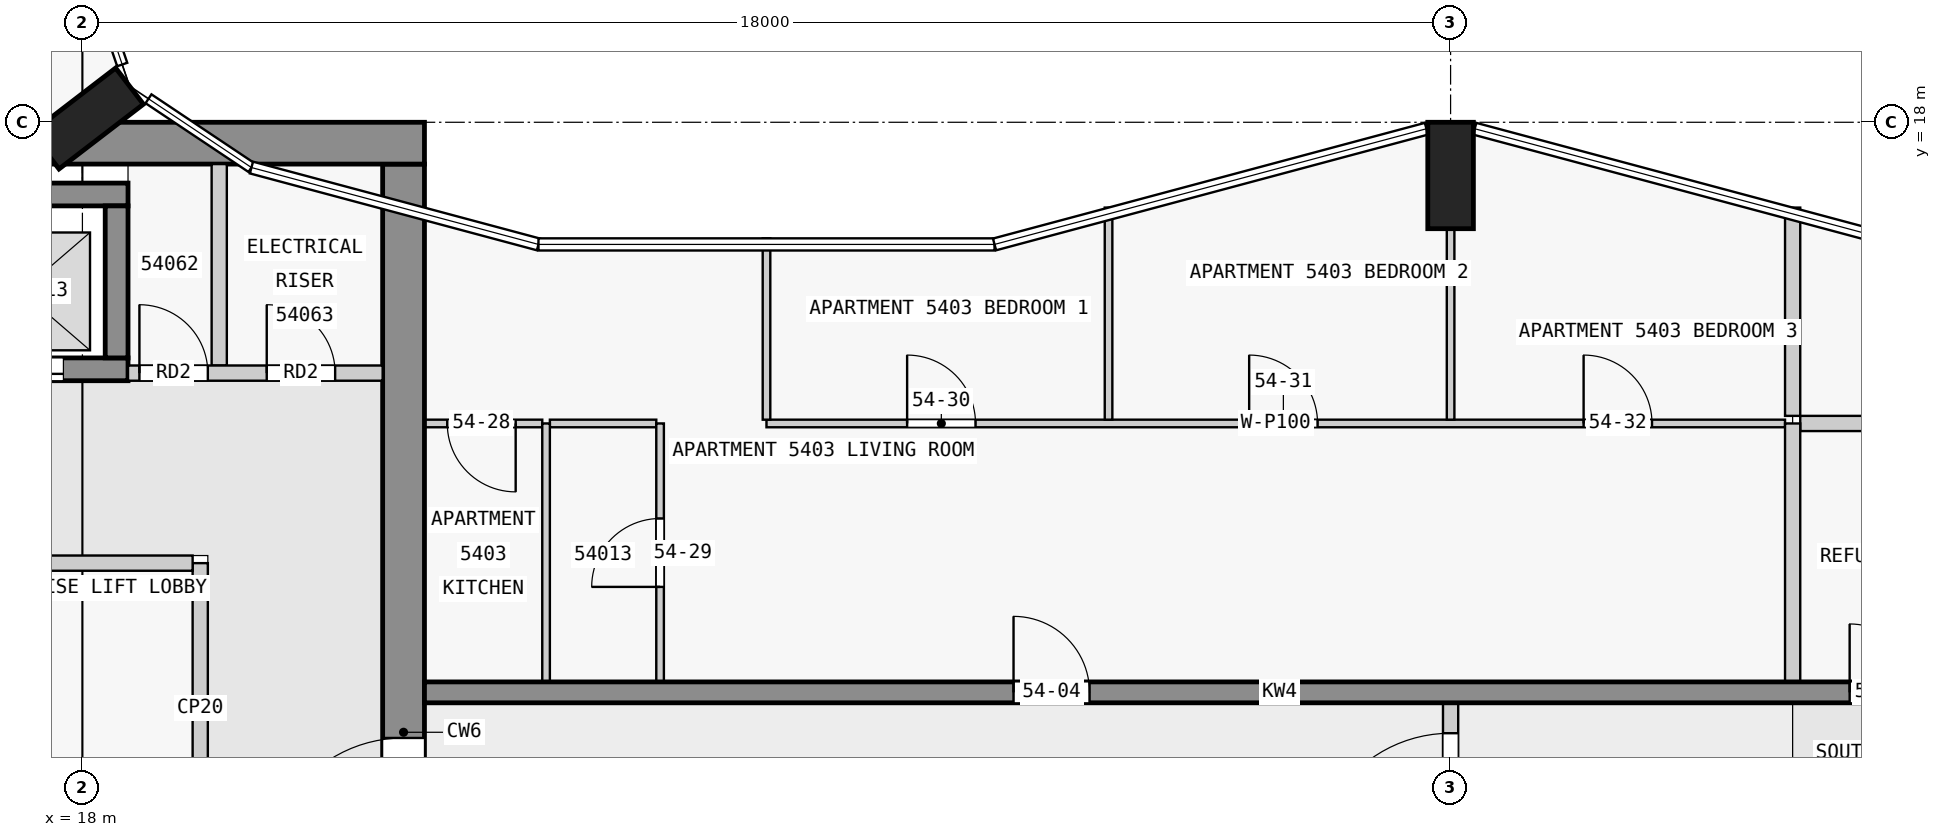
"""IFC4 building model, lengths in metres.
Left out: names, types, materials, properties, quantities, classifications, styles, units other than length and angle.
Written with IfcOpenShell. Run it as: python <this file> out.ifc"""

import sys

from ifc_helpers import new_model, si_unit, direction, frame, frame_2d, origin, origin_2d, place, context, subcontext, project, spatial, rectangle, extrude, element, fill, save


model = new_model("IFC4")
c1 = context("Model", 3, precision=1e-05, world=origin(), true_north=direction((0.0, 1.0)))
c2 = subcontext(c1, "Body", "Model", "MODEL_VIEW")
j1 = project(units=[si_unit("LENGTHUNIT", "METRE"), si_unit("PLANEANGLEUNIT", "RADIAN")], contexts=[c1])
p1 = place(None, origin())
s1 = spatial("IfcSite", under=j1, at=p1, CompositionType="ELEMENT")
p2 = place(p1, origin())
s2 = spatial("IfcBuilding", under=s1, at=p2, CompositionType="ELEMENT")
p3 = place(p2, frame((0.0, 0.0, 208.4)))
s3 = spatial("IfcBuildingStorey", under=s2, at=p3, CompositionType="ELEMENT", Elevation=208.4)
for number, where, z_axis, x_axis in (
    (1, (36.0, 17.3, 0.0), (0.0, 0.0, 1.0), (1.0, 0.0, 0.0)),
    (2, (18.065, 18.05, 0.0), (0.0, 0.0, 1.0), (-0.609, 0.793, 0.0)),
):
    element("IfcColumn", number, at=place(p3, frame(where, z_axis=z_axis, x_axis=x_axis)), inside=s3, PredefinedType="COLUMN", context=c2, shape_type="SweptSolid", body=[
        extrude(rectangle(XDim=0.6, YDim=1.4, at=origin_2d()), origin(), (0.0, 0.0, 1.0), 3.5),
    ])
p4 = place(p3, frame((1.38, 17.725, 0.0), z_axis=(0.0, 0.0, 1.0), x_axis=(1.0, 0.0, 0.0)))
e3 = element("IfcWall", 3, at=p4, inside=s3, PredefinedType="SHEAR", context=c2, shape_type="SweptSolid", body=[
    extrude(rectangle(XDim=21.12, YDim=0.55, at=frame_2d((10.56, 0.0))), origin(), (0.0, 0.0, 1.0), 3.25),
])
p5 = place(p4, frame((6.35, 0.0, 0.0)))
e4 = element("IfcOpeningElement", 4, at=p5, cuts=e3, PredefinedType="OPENING", context=c2, shape_type="SweptSolid", body=[
    extrude(rectangle(XDim=1.8, YDim=2.1, at=frame_2d((0.9, 1.05))), frame((0.0, 0.285, 0.0), z_axis=(0.0, -1.0, 0.0), x_axis=(1.0, 0.0, 0.0)), (0.0, 0.0, 1.0), 0.57),
])
p6 = place(p3, frame((22.225, 2.5, 0.0), z_axis=(0.0, 0.0, 1.0), x_axis=(0.0, 1.0, 0.0)))
e5 = element("IfcWall", 5, at=p6, inside=s3, PredefinedType="SHEAR", context=c2, shape_type="SweptSolid", body=[
    extrude(rectangle(XDim=14.95, YDim=0.55, at=frame_2d((7.475, 0.0))), origin(), (0.0, 0.0, 1.0), 3.25),
])
p7 = place(p6, frame((5.6, 0.0, 0.0)))
e6 = element("IfcOpeningElement", 6, at=p7, cuts=e5, PredefinedType="OPENING", context=c2, shape_type="SweptSolid", body=[
    extrude(rectangle(XDim=1.8, YDim=2.1, at=frame_2d((0.9, 1.05))), frame((0.0, 0.285, 0.0), z_axis=(0.0, -1.0, 0.0), x_axis=(1.0, 0.0, 0.0)), (0.0, 0.0, 1.0), 0.57),
])
p8 = place(p3, frame((10.8, 17.05, 0.0), z_axis=(0.0, 0.0, 1.0), x_axis=(1.0, 0.0, 0.0)))
e7 = element("IfcWall", 7, at=p8, inside=s3, PredefinedType="SHEAR", context=c2, shape_type="SweptSolid", body=[
    extrude(rectangle(XDim=7.8, YDim=0.3, at=frame_2d((3.9, 0.0))), origin(), (0.0, 0.0, 1.0), 3.25),
])
p9 = place(p3, frame((10.8, 14.75, 0.0), z_axis=(0.0, 0.0, 1.0), x_axis=(1.0, 0.0, 0.0)))
e8 = element("IfcWall", 8, at=p9, inside=s3, PredefinedType="SHEAR", context=c2, shape_type="SweptSolid", body=[
    extrude(rectangle(XDim=7.8, YDim=0.3, at=frame_2d((3.9, 0.0))), origin(), (0.0, 0.0, 1.0), 3.25),
])
p10 = place(p9, frame((0.85, 0.0, 0.0)))
e9 = element("IfcOpeningElement", 9, at=p10, cuts=e8, PredefinedType="OPENING", context=c2, shape_type="SweptSolid", body=[
    extrude(rectangle(XDim=1.1, YDim=2.1, at=frame_2d((0.55, 1.05))), frame((0.0, 0.16, 0.0), z_axis=(0.0, -1.0, 0.0), x_axis=(1.0, 0.0, 0.0)), (0.0, 0.0, 1.0), 0.32),
])
p11 = place(p9, frame((3.35, 0.0, 0.0)))
e10 = element("IfcOpeningElement", 10, at=p11, cuts=e8, PredefinedType="OPENING", context=c2, shape_type="SweptSolid", body=[
    extrude(rectangle(XDim=1.1, YDim=2.1, at=frame_2d((0.55, 1.05))), frame((0.0, 0.16, 0.0), z_axis=(0.0, -1.0, 0.0), x_axis=(1.0, 0.0, 0.0)), (0.0, 0.0, 1.0), 0.32),
])
p12 = place(p9, frame((5.85, 0.0, 0.0)))
e11 = element("IfcOpeningElement", 11, at=p12, cuts=e8, PredefinedType="OPENING", context=c2, shape_type="SweptSolid", body=[
    extrude(rectangle(XDim=1.1, YDim=2.1, at=frame_2d((0.55, 1.05))), frame((0.0, 0.16, 0.0), z_axis=(0.0, -1.0, 0.0), x_axis=(1.0, 0.0, 0.0)), (0.0, 0.0, 1.0), 0.32),
])
p13 = place(p3, frame((18.45, 14.9, 0.0), z_axis=(0.0, 0.0, 1.0), x_axis=(0.0, 1.0, 0.0)))
e12 = element("IfcWall", 12, at=p13, inside=s3, PredefinedType="SHEAR", context=c2, shape_type="SweptSolid", body=[
    extrude(rectangle(XDim=2.0, YDim=0.3, at=frame_2d((1.0, 0.0))), origin(), (0.0, 0.0, 1.0), 3.25),
])
p14 = place(p3, frame((22.5, 10.5, 0.0), z_axis=(0.0, 0.0, 1.0), x_axis=(1.0, 0.0, 0.0)))
e13 = element("IfcWall", 13, at=p14, inside=s3, PredefinedType="SHEAR", context=c2, shape_type="SweptSolid", body=[
    extrude(rectangle(XDim=22.5, YDim=0.275, at=frame_2d((11.25, 0.0))), origin(), (0.0, 0.0, 1.0), 3.25),
])
p15 = place(p14, frame((7.75, 0.0, 0.0)))
e14 = element("IfcOpeningElement", 14, at=p15, cuts=e13, PredefinedType="OPENING", context=c2, shape_type="SweptSolid", body=[
    extrude(rectangle(XDim=1.0, YDim=2.1, at=frame_2d((0.5, 1.05))), frame((0.0, 0.147, 0.0), z_axis=(0.0, -1.0, 0.0), x_axis=(1.0, 0.0, 0.0)), (0.0, 0.0, 1.0), 0.295),
])
p16 = place(p14, frame((18.75, 0.0, 0.0)))
e15 = element("IfcOpeningElement", 15, at=p16, cuts=e13, PredefinedType="OPENING", context=c2, shape_type="SweptSolid", body=[
    extrude(rectangle(XDim=0.9, YDim=2.1, at=frame_2d((0.45, 1.05))), frame((0.0, 0.147, 0.0), z_axis=(0.0, -1.0, 0.0), x_axis=(1.0, 0.0, 0.0)), (0.0, 0.0, 1.0), 0.295),
])
p17 = place(p14, frame((20.95, 0.0, 0.0)))
e16 = element("IfcOpeningElement", 16, at=p17, cuts=e13, PredefinedType="OPENING", context=c2, shape_type="SweptSolid", body=[
    extrude(rectangle(XDim=1.0, YDim=2.1, at=frame_2d((0.5, 1.05))), frame((0.0, 0.147, 0.0), z_axis=(0.0, -1.0, 0.0), x_axis=(1.0, 0.0, 0.0)), (0.0, 0.0, 1.0), 0.295),
])
p18 = place(p3, frame((19.55, 8.4, 0.0), z_axis=(0.0, 0.0, 1.0), x_axis=(0.0, 1.0, 0.0)))
e17 = element("IfcWall", 17, at=p18, inside=s3, PredefinedType="PARTITIONING", context=c2, shape_type="SweptSolid", body=[
    extrude(rectangle(XDim=3.8, YDim=0.2, at=frame_2d((1.9, 0.0))), origin(), (0.0, 0.0, 1.0), 3.25),
])
p19 = place(p3, frame((10.9, 12.2, 0.0), z_axis=(0.0, 0.0, 1.0), x_axis=(1.0, 0.0, 0.0)))
e18 = element("IfcWall", 18, at=p19, inside=s3, PredefinedType="PARTITIONING", context=c2, shape_type="SweptSolid", body=[
    extrude(rectangle(XDim=8.55, YDim=0.2, at=frame_2d((4.275, 0.0))), origin(), (0.0, 0.0, 1.0), 3.25),
])
p20 = place(p19, frame((3.825, 0.0, 0.0)))
e19 = element("IfcOpeningElement", 19, at=p20, cuts=e18, PredefinedType="OPENING", context=c2, shape_type="SweptSolid", body=[
    extrude(rectangle(XDim=0.9, YDim=2.1, at=frame_2d((0.45, 1.05))), frame((0.0, 0.11, 0.0), z_axis=(0.0, -1.0, 0.0), x_axis=(1.0, 0.0, 0.0)), (0.0, 0.0, 1.0), 0.22),
])
p21 = place(p3, frame((18.6, 14.7, 0.0), z_axis=(0.0, 0.0, 1.0), x_axis=(1.0, 0.0, 0.0)))
e20 = element("IfcWall", 20, at=p21, inside=s3, PredefinedType="PARTITIONING", context=c2, shape_type="SweptSolid", body=[
    extrude(rectangle(XDim=3.35, YDim=0.2, at=frame_2d((1.675, 0.0))), origin(), (0.0, 0.0, 1.0), 3.25),
])
p22 = place(p21, frame((0.15, 0.0, 0.0)))
e21 = element("IfcOpeningElement", 21, at=p22, cuts=e20, PredefinedType="OPENING", context=c2, shape_type="SweptSolid", body=[
    extrude(rectangle(XDim=0.9, YDim=2.1, at=frame_2d((0.45, 1.05))), frame((0.0, 0.11, 0.0), z_axis=(0.0, -1.0, 0.0), x_axis=(1.0, 0.0, 0.0)), (0.0, 0.0, 1.0), 0.22),
])
p23 = place(p21, frame((1.825, 0.0, 0.0)))
e22 = element("IfcOpeningElement", 22, at=p23, cuts=e20, PredefinedType="OPENING", context=c2, shape_type="SweptSolid", body=[
    extrude(rectangle(XDim=0.9, YDim=2.1, at=frame_2d((0.45, 1.05))), frame((0.0, 0.11, 0.0), z_axis=(0.0, -1.0, 0.0), x_axis=(1.0, 0.0, 0.0)), (0.0, 0.0, 1.0), 0.22),
])
p24 = place(p3, frame((19.8, 14.8, 0.0), z_axis=(0.0, 0.0, 1.0), x_axis=(0.0, 1.0, 0.0)))
e23 = element("IfcWall", 23, at=p24, inside=s3, PredefinedType="PARTITIONING", context=c2, shape_type="SweptSolid", body=[
    extrude(rectangle(XDim=2.65, YDim=0.2, at=frame_2d((1.325, 0.0))), origin(), (0.0, 0.0, 1.0), 3.25),
])
p25 = place(p3, frame((24.05, 14.038, 0.0), z_axis=(0.0, 0.0, 1.0), x_axis=(-1.0, 0.0, 0.0)))
e24 = element("IfcWall", 24, at=p25, inside=s3, PredefinedType="PARTITIONING", context=c2, shape_type="SweptSolid", body=[
    extrude(rectangle(XDim=1.55, YDim=0.1, at=frame_2d((0.775, 0.0))), origin(), (0.0, 0.0, 1.0), 3.25),
])
p26 = place(p25, frame((0.35, 0.0, 0.0)))
e25 = element("IfcOpeningElement", 25, at=p26, cuts=e24, PredefinedType="OPENING", context=c2, shape_type="SweptSolid", body=[
    extrude(rectangle(XDim=0.9, YDim=2.1, at=frame_2d((0.45, 1.05))), frame((0.0, 0.06, 0.0), z_axis=(0.0, -1.0, 0.0), x_axis=(1.0, 0.0, 0.0)), (0.0, 0.0, 1.0), 0.12),
])
p27 = place(p3, frame((25.55, 14.038, 0.0), z_axis=(0.0, 0.0, 1.0), x_axis=(-1.0, 0.0, 0.0)))
e26 = element("IfcWall", 26, at=p27, inside=s3, PredefinedType="PARTITIONING", context=c2, shape_type="SweptSolid", body=[
    extrude(rectangle(XDim=1.4, YDim=0.1, at=frame_2d((0.7, 0.0))), origin(), (0.0, 0.0, 1.0), 3.25),
])
p28 = place(p3, frame((27.0, 14.038, 0.0), z_axis=(0.0, 0.0, 1.0), x_axis=(1.0, 0.0, 0.0)))
e27 = element("IfcWall", 27, at=p28, inside=s3, PredefinedType="PARTITIONING", context=c2, shape_type="SweptSolid", body=[
    extrude(rectangle(XDim=13.4, YDim=0.1, at=frame_2d((6.7, 0.0))), origin(), (0.0, 0.0, 1.0), 3.25),
])
p29 = place(p28, frame((1.85, 0.0, 0.0)))
e28 = element("IfcOpeningElement", 28, at=p29, cuts=e27, PredefinedType="OPENING", context=c2, shape_type="SweptSolid", body=[
    extrude(rectangle(XDim=0.9, YDim=2.1, at=frame_2d((0.45, 1.05))), frame((0.0, 0.06, 0.0), z_axis=(0.0, -1.0, 0.0), x_axis=(1.0, 0.0, 0.0)), (0.0, 0.0, 1.0), 0.12),
])
p30 = place(p28, frame((6.35, 0.0, 0.0)))
e29 = element("IfcOpeningElement", 29, at=p30, cuts=e27, PredefinedType="OPENING", context=c2, shape_type="SweptSolid", body=[
    extrude(rectangle(XDim=0.9, YDim=2.1, at=frame_2d((0.45, 1.05))), frame((0.0, 0.06, 0.0), z_axis=(0.0, -1.0, 0.0), x_axis=(1.0, 0.0, 0.0)), (0.0, 0.0, 1.0), 0.12),
])
p31 = place(p28, frame((10.75, 0.0, 0.0)))
e30 = element("IfcOpeningElement", 30, at=p31, cuts=e27, PredefinedType="OPENING", context=c2, shape_type="SweptSolid", body=[
    extrude(rectangle(XDim=0.9, YDim=2.1, at=frame_2d((0.45, 1.05))), frame((0.0, 0.06, 0.0), z_axis=(0.0, -1.0, 0.0), x_axis=(1.0, 0.0, 0.0)), (0.0, 0.0, 1.0), 0.12),
])
p32 = place(p3, frame((42.8, 14.038, 0.0), z_axis=(0.0, 0.0, 1.0), x_axis=(-1.0, 0.0, 0.0)))
e31 = element("IfcWall", 31, at=p32, inside=s3, PredefinedType="PARTITIONING", context=c2, shape_type="SweptSolid", body=[
    extrude(rectangle(XDim=2.2, YDim=0.2, at=frame_2d((1.1, 0.0))), origin(), (0.0, 0.0, 1.0), 3.25),
])
p33 = place(p3, frame((24.1, 10.637, 0.0), z_axis=(0.0, 0.0, 1.0), x_axis=(0.0, 1.0, 0.0)))
e32 = element("IfcWall", 32, at=p33, inside=s3, PredefinedType="PARTITIONING", context=c2, shape_type="SweptSolid", body=[
    extrude(rectangle(XDim=3.4, YDim=0.1, at=frame_2d((1.7, 0.0))), origin(), (0.0, 0.0, 1.0), 3.25),
])
p34 = place(p3, frame((25.6, 10.637, 0.0), z_axis=(0.0, 0.0, 1.0), x_axis=(0.0, 1.0, 0.0)))
e33 = element("IfcWall", 33, at=p34, inside=s3, PredefinedType="PARTITIONING", context=c2, shape_type="SweptSolid", body=[
    extrude(rectangle(XDim=3.4, YDim=0.1, at=frame_2d((1.7, 0.0))), origin(), (0.0, 0.0, 1.0), 3.25),
])
p35 = place(p34, frame((1.25, 0.0, 0.0)))
e34 = element("IfcOpeningElement", 34, at=p35, cuts=e33, PredefinedType="OPENING", context=c2, shape_type="SweptSolid", body=[
    extrude(rectangle(XDim=0.9, YDim=2.1, at=frame_2d((0.45, 1.05))), frame((0.0, 0.06, 0.0), z_axis=(0.0, -1.0, 0.0), x_axis=(1.0, 0.0, 0.0)), (0.0, 0.0, 1.0), 0.12),
])
p36 = place(p3, frame((27.0, 16.473, 0.0), z_axis=(0.0, 0.0, 1.0), x_axis=(0.0, -1.0, 0.0)))
e35 = element("IfcWall", 35, at=p36, inside=s3, PredefinedType="PARTITIONING", context=c2, shape_type="SweptSolid", body=[
    extrude(rectangle(XDim=2.386, YDim=0.1, at=frame_2d((1.193, 0.0))), origin(), (0.0, 0.0, 1.0), 3.25),
])
p37 = place(p3, frame((31.5, 14.087, 0.0), z_axis=(0.0, 0.0, 1.0), x_axis=(0.0, 1.0, 0.0)))
e36 = element("IfcWall", 36, at=p37, inside=s3, PredefinedType="PARTITIONING", context=c2, shape_type="SweptSolid", body=[
    extrude(rectangle(XDim=2.79, YDim=0.1, at=frame_2d((1.395, 0.0))), origin(), (0.0, 0.0, 1.0), 3.25),
])
p38 = place(p3, frame((36.0, 14.087, 0.0), z_axis=(0.0, 0.0, 1.0), x_axis=(0.0, 1.0, 0.0)))
e37 = element("IfcWall", 37, at=p38, inside=s3, PredefinedType="PARTITIONING", context=c2, shape_type="SweptSolid", body=[
    extrude(rectangle(XDim=2.513, YDim=0.1, at=frame_2d((1.256, 0.0))), origin(), (0.0, 0.0, 1.0), 3.25),
])
p39 = place(p3, frame((40.5, 14.038, 0.0), z_axis=(0.0, 0.0, 1.0), x_axis=(0.0, -1.0, 0.0)))
e38 = element("IfcWall", 38, at=p39, inside=s3, PredefinedType="PARTITIONING", context=c2, shape_type="SweptSolid", body=[
    extrude(rectangle(XDim=3.4, YDim=0.2, at=frame_2d((1.7, 0.0))), origin(), (0.0, 0.0, 1.0), 3.25),
])
p40 = place(p3, frame((40.5, 14.137, 0.0), z_axis=(0.0, 0.0, 1.0), x_axis=(0.0, 1.0, 0.0)))
e39 = element("IfcWall", 39, at=p40, inside=s3, PredefinedType="PARTITIONING", context=c2, shape_type="SweptSolid", body=[
    extrude(rectangle(XDim=2.74, YDim=0.2, at=frame_2d((1.37, 0.0))), origin(), (0.0, 0.0, 1.0), 3.25),
])
p41 = place(p3, frame((36.0, 7.462, 0.0), z_axis=(0.0, 0.0, 1.0), x_axis=(0.0, 1.0, 0.0)))
e40 = element("IfcWall", 40, at=p41, inside=s3, PredefinedType="PARTITIONING", context=c2, shape_type="SweptSolid", body=[
    extrude(rectangle(XDim=3.175, YDim=0.2, at=frame_2d((1.587, 0.0))), origin(), (0.0, 0.0, 1.0), 3.25),
])
p42 = place(p41, frame((0.7, 0.0, 0.0)))
e41 = element("IfcOpeningElement", 41, at=p42, cuts=e40, PredefinedType="OPENING", context=c2, shape_type="SweptSolid", body=[
    extrude(rectangle(XDim=1.8, YDim=2.1, at=frame_2d((0.9, 1.05))), frame((0.0, 0.11, 0.0), z_axis=(0.0, -1.0, 0.0), x_axis=(1.0, 0.0, 0.0)), (0.0, 0.0, 1.0), 0.22),
])
p43 = place(p12, origin())
e42 = element("IfcDoor", 42, at=p43, inside=s3, OperationType="DOUBLE_DOOR_SLIDING", PredefinedType="DOOR", context=c2, shape_type="SweptSolid", body=[
    extrude(rectangle(XDim=1.1, YDim=2.1, at=frame_2d((0.55, 1.05))), frame((0.0, 0.025, 0.0), z_axis=(0.0, -1.0, 0.0), x_axis=(1.0, 0.0, 0.0)), (0.0, 0.0, 1.0), 0.05),
])
fill(e11, e42)
p44 = place(p7, origin())
e43 = element("IfcDoor", 43, at=p44, inside=s3, OperationType="DOUBLE_DOOR_SINGLE_SWING", PredefinedType="DOOR", context=c2, shape_type="SweptSolid", body=[
    extrude(rectangle(XDim=1.8, YDim=2.1, at=frame_2d((0.9, 1.05))), frame((0.0, 0.025, 0.0), z_axis=(0.0, -1.0, 0.0), x_axis=(1.0, 0.0, 0.0)), (0.0, 0.0, 1.0), 0.05),
])
fill(e6, e43)
p45 = place(p22, origin())
e44 = element("IfcDoor", 44, at=p45, inside=s3, OperationType="SINGLE_SWING_LEFT", PredefinedType="DOOR", context=c2, shape_type="SweptSolid", body=[
    extrude(rectangle(XDim=0.9, YDim=2.1, at=frame_2d((0.45, 1.05))), frame((0.0, 0.025, 0.0), z_axis=(0.0, -1.0, 0.0), x_axis=(1.0, 0.0, 0.0)), (0.0, 0.0, 1.0), 0.05),
])
fill(e21, e44)
p46 = place(p23, origin())
e45 = element("IfcDoor", 45, at=p46, inside=s3, OperationType="SINGLE_SWING_LEFT", PredefinedType="DOOR", context=c2, shape_type="SweptSolid", body=[
    extrude(rectangle(XDim=0.9, YDim=2.1, at=frame_2d((0.45, 1.05))), frame((0.0, 0.025, 0.0), z_axis=(0.0, -1.0, 0.0), x_axis=(1.0, 0.0, 0.0)), (0.0, 0.0, 1.0), 0.05),
])
fill(e22, e45)
p47 = place(p15, origin())
e46 = element("IfcDoor", 46, at=p47, inside=s3, OperationType="SINGLE_SWING_LEFT", PredefinedType="DOOR", context=c2, shape_type="SweptSolid", body=[
    extrude(rectangle(XDim=1.0, YDim=2.1, at=frame_2d((0.5, 1.05))), frame((0.0, 0.025, 0.0), z_axis=(0.0, -1.0, 0.0), x_axis=(1.0, 0.0, 0.0)), (0.0, 0.0, 1.0), 0.05),
])
fill(e14, e46)
p48 = place(p16, origin())
e47 = element("IfcDoor", 47, at=p48, inside=s3, OperationType="SINGLE_SWING_RIGHT", PredefinedType="DOOR", context=c2, shape_type="SweptSolid", body=[
    extrude(rectangle(XDim=0.9, YDim=2.1, at=frame_2d((0.45, 1.05))), frame((0.0, 0.025, 0.0), z_axis=(0.0, -1.0, 0.0), x_axis=(1.0, 0.0, 0.0)), (0.0, 0.0, 1.0), 0.05),
])
fill(e15, e47)
p49 = place(p42, origin())
e48 = element("IfcDoor", 48, at=p49, inside=s3, OperationType="SINGLE_SWING_RIGHT", PredefinedType="DOOR", context=c2, shape_type="SweptSolid", body=[
    extrude(rectangle(XDim=1.8, YDim=2.1, at=frame_2d((0.9, 1.05))), frame((0.0, 0.025, 0.0), z_axis=(0.0, -1.0, 0.0), x_axis=(1.0, 0.0, 0.0)), (0.0, 0.0, 1.0), 0.05),
])
fill(e41, e48)
p50 = place(p26, origin())
e49 = element("IfcDoor", 49, at=p50, inside=s3, OperationType="SINGLE_SWING_RIGHT", PredefinedType="DOOR", context=c2, shape_type="SweptSolid", body=[
    extrude(rectangle(XDim=0.9, YDim=2.1, at=frame_2d((0.45, 1.05))), frame((0.0, 0.025, 0.0), z_axis=(0.0, -1.0, 0.0), x_axis=(1.0, 0.0, 0.0)), (0.0, 0.0, 1.0), 0.05),
])
fill(e25, e49)
p51 = place(p35, origin())
e50 = element("IfcDoor", 50, at=p51, inside=s3, OperationType="SINGLE_SWING_LEFT", PredefinedType="DOOR", context=c2, shape_type="SweptSolid", body=[
    extrude(rectangle(XDim=0.9, YDim=2.1, at=frame_2d((0.45, 1.05))), frame((0.0, 0.025, 0.0), z_axis=(0.0, -1.0, 0.0), x_axis=(1.0, 0.0, 0.0)), (0.0, 0.0, 1.0), 0.05),
])
fill(e34, e50)
p52 = place(p29, origin())
e51 = element("IfcDoor", 51, at=p52, inside=s3, OperationType="SINGLE_SWING_LEFT", PredefinedType="DOOR", context=c2, shape_type="SweptSolid", body=[
    extrude(rectangle(XDim=0.9, YDim=2.1, at=frame_2d((0.45, 1.05))), frame((0.0, 0.025, 0.0), z_axis=(0.0, -1.0, 0.0), x_axis=(1.0, 0.0, 0.0)), (0.0, 0.0, 1.0), 0.05),
])
fill(e28, e51)
p53 = place(p30, origin())
e52 = element("IfcDoor", 52, at=p53, inside=s3, OperationType="SINGLE_SWING_RIGHT", PredefinedType="DOOR", context=c2, shape_type="SweptSolid", body=[
    extrude(rectangle(XDim=0.9, YDim=2.1, at=frame_2d((0.45, 1.05))), frame((0.0, 0.025, 0.0), z_axis=(0.0, -1.0, 0.0), x_axis=(1.0, 0.0, 0.0)), (0.0, 0.0, 1.0), 0.05),
])
fill(e29, e52)
p54 = place(p31, origin())
e53 = element("IfcDoor", 53, at=p54, inside=s3, OperationType="SINGLE_SWING_RIGHT", PredefinedType="DOOR", context=c2, shape_type="SweptSolid", body=[
    extrude(rectangle(XDim=0.9, YDim=2.1, at=frame_2d((0.45, 1.05))), frame((0.0, 0.025, 0.0), z_axis=(0.0, -1.0, 0.0), x_axis=(1.0, 0.0, 0.0)), (0.0, 0.0, 1.0), 0.05),
])
fill(e30, e53)
save(model, sys.argv[1])
